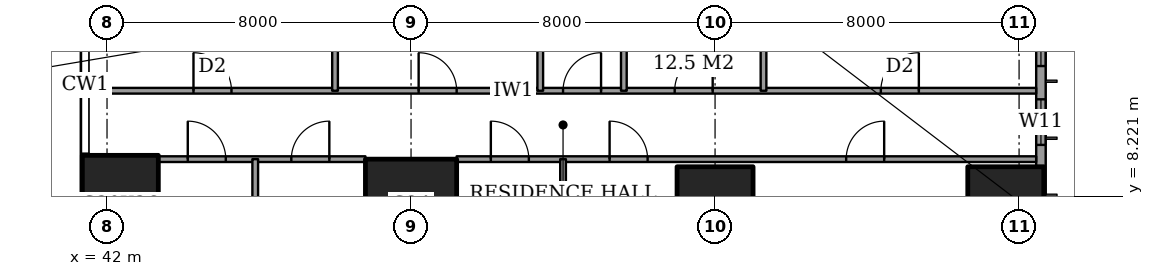
"""IFC4 building model, lengths in metres.
Left out: names, types, materials, properties, quantities, classifications, styles, units other than length and angle.
Written with IfcOpenShell. Run it as: python <this file> out.ifc"""

import sys

from ifc_helpers import new_model, si_unit, direction, frame, frame_2d, origin, origin_2d, place, context, subcontext, project, spatial, rectangle, extrude, element, fill, save


model = new_model("IFC4")
c1 = context("Model", 3, precision=1e-05, world=origin(), true_north=direction((0.0, 1.0)))
c2 = subcontext(c1, "Body", "Model", "MODEL_VIEW")
j1 = project(units=[si_unit("LENGTHUNIT", "METRE"), si_unit("PLANEANGLEUNIT", "RADIAN")], contexts=[c1])
p1 = place(None, origin())
s1 = spatial("IfcSite", under=j1, at=p1, CompositionType="ELEMENT")
p2 = place(p1, origin())
s2 = spatial("IfcBuilding", under=s1, at=p2, CompositionType="ELEMENT")
p3 = place(p2, frame((0.0, 0.0, 117.8)))
s3 = spatial("IfcBuildingStorey", under=s2, at=p3, CompositionType="ELEMENT", Elevation=117.8)
p4 = place(p3, frame((42.35, 8.0, 0.0), z_axis=(0.0, 0.0, 1.0), x_axis=(1.0, 0.0, 0.0)))
e1 = element("IfcColumn", 1, at=p4, inside=s3, PredefinedType="COLUMN", context=c2, shape_type="SweptSolid", body=[
    extrude(rectangle(XDim=2.0, YDim=2.6, at=origin_2d()), origin(), (0.0, 0.0, 1.0), 3.6),
])
p5 = place(p3, frame((50.0, 8.0, 0.0), z_axis=(0.0, 0.0, 1.0), x_axis=(1.0, 0.0, 0.0)))
e2 = element("IfcColumn", 2, at=p5, inside=s3, PredefinedType="COLUMN", context=c2, shape_type="SweptSolid", body=[
    extrude(rectangle(XDim=2.4, YDim=2.4, at=origin_2d()), origin(), (0.0, 0.0, 1.0), 3.6),
])
for number, where, z_axis, x_axis in (
    (3, (58.0, 8.0, 0.0), (0.0, 0.0, 1.0), (1.0, 0.0, 0.0)),
    (4, (65.65, 8.0, 0.0), (0.0, 0.0, 1.0), (1.0, 0.0, 0.0)),
):
    element("IfcColumn", number, at=place(p3, frame(where, z_axis=z_axis, x_axis=x_axis)), inside=s3, PredefinedType="COLUMN", context=c2, shape_type="SweptSolid", body=[
        extrude(rectangle(XDim=2.0, YDim=2.0, at=origin_2d()), origin(), (0.0, 0.0, 1.0), 3.6),
    ])
p6 = place(p3, frame((66.575, 3.175, 0.0), z_axis=(0.0, 0.0, 1.0), x_axis=(0.0, 1.0, 0.0)))
e5 = element("IfcWall", 5, at=p6, inside=s3, PredefinedType="SOLIDWALL", context=c2, shape_type="SweptSolid", body=[
    extrude(rectangle(XDim=41.65, YDim=0.25, at=frame_2d((20.825, 0.0))), origin(), (0.0, 0.0, 1.0), 3.6),
])
p7 = place(p6, frame((0.775, 0.0, 0.4)))
e6 = element("IfcOpeningElement", 6, at=p7, cuts=e5, PredefinedType="OPENING", context=c2, shape_type="SweptSolid", body=[
    extrude(rectangle(XDim=2.4, YDim=2.2, at=frame_2d((1.2, 1.1))), frame((0.0, 0.135, 0.0), z_axis=(0.0, -1.0, 0.0), x_axis=(1.0, 0.0, 0.0)), (0.0, 0.0, 1.0), 0.27),
])
p8 = place(p6, frame((6.4, 0.0, 0.4)))
e7 = element("IfcOpeningElement", 7, at=p8, cuts=e5, PredefinedType="OPENING", context=c2, shape_type="SweptSolid", body=[
    extrude(rectangle(XDim=1.2, YDim=2.2, at=frame_2d((0.6, 1.1))), frame((0.0, 0.135, 0.0), z_axis=(0.0, -1.0, 0.0), x_axis=(1.0, 0.0, 0.0)), (0.0, 0.0, 1.0), 0.27),
])
p9 = place(p6, frame((8.475, 0.0, 0.4)))
e8 = element("IfcOpeningElement", 8, at=p9, cuts=e5, PredefinedType="OPENING", context=c2, shape_type="SweptSolid", body=[
    extrude(rectangle(XDim=2.4, YDim=2.2, at=frame_2d((1.2, 1.1))), frame((0.0, 0.135, 0.0), z_axis=(0.0, -1.0, 0.0), x_axis=(1.0, 0.0, 0.0)), (0.0, 0.0, 1.0), 0.27),
])
p10 = place(p6, frame((15.775, 0.0, 0.4)))
e9 = element("IfcOpeningElement", 9, at=p10, cuts=e5, PredefinedType="OPENING", context=c2, shape_type="SweptSolid", body=[
    extrude(rectangle(XDim=2.4, YDim=2.2, at=frame_2d((1.2, 1.1))), frame((0.0, 0.135, 0.0), z_axis=(0.0, -1.0, 0.0), x_axis=(1.0, 0.0, 0.0)), (0.0, 0.0, 1.0), 0.27),
])
p11 = place(p6, frame((23.475, 0.0, 0.4)))
e10 = element("IfcOpeningElement", 10, at=p11, cuts=e5, PredefinedType="OPENING", context=c2, shape_type="SweptSolid", body=[
    extrude(rectangle(XDim=2.4, YDim=2.2, at=frame_2d((1.2, 1.1))), frame((0.0, 0.135, 0.0), z_axis=(0.0, -1.0, 0.0), x_axis=(1.0, 0.0, 0.0)), (0.0, 0.0, 1.0), 0.27),
])
p12 = place(p6, frame((30.975, 0.0, 0.4)))
e11 = element("IfcOpeningElement", 11, at=p12, cuts=e5, PredefinedType="OPENING", context=c2, shape_type="SweptSolid", body=[
    extrude(rectangle(XDim=2.4, YDim=2.2, at=frame_2d((1.2, 1.1))), frame((0.0, 0.135, 0.0), z_axis=(0.0, -1.0, 0.0), x_axis=(1.0, 0.0, 0.0)), (0.0, 0.0, 1.0), 0.27),
])
p13 = place(p6, frame((34.5, 0.0, 0.4)))
e12 = element("IfcOpeningElement", 12, at=p13, cuts=e5, PredefinedType="OPENING", context=c2, shape_type="SweptSolid", body=[
    extrude(rectangle(XDim=1.2, YDim=2.2, at=frame_2d((0.6, 1.1))), frame((0.0, 0.135, 0.0), z_axis=(0.0, -1.0, 0.0), x_axis=(1.0, 0.0, 0.0)), (0.0, 0.0, 1.0), 0.27),
])
p14 = place(p6, frame((38.475, 0.0, 0.4)))
e13 = element("IfcOpeningElement", 13, at=p14, cuts=e5, PredefinedType="OPENING", context=c2, shape_type="SweptSolid", body=[
    extrude(rectangle(XDim=2.4, YDim=2.2, at=frame_2d((1.2, 1.1))), frame((0.0, 0.135, 0.0), z_axis=(0.0, -1.0, 0.0), x_axis=(1.0, 0.0, 0.0)), (0.0, 0.0, 1.0), 0.27),
])
p15 = place(p3, frame((43.35, 9.2, 0.0), z_axis=(0.0, 0.0, 1.0), x_axis=(1.0, 0.0, 0.0)))
e14 = element("IfcWall", 14, at=p15, inside=s3, PredefinedType="PARTITIONING", context=c2, shape_type="SweptSolid", body=[
    extrude(rectangle(XDim=5.45, YDim=0.15, at=frame_2d((2.725, 0.0))), origin(), (0.0, 0.0, 1.0), 3.35),
])
p16 = place(p15, frame((3.5, 0.0, 0.0)))
e15 = element("IfcOpeningElement", 15, at=p16, cuts=e14, PredefinedType="OPENING", context=c2, shape_type="SweptSolid", body=[
    extrude(rectangle(XDim=1.0, YDim=2.1, at=frame_2d((0.5, 1.05))), frame((0.0, 0.085, 0.0), z_axis=(0.0, -1.0, 0.0), x_axis=(1.0, 0.0, 0.0)), (0.0, 0.0, 1.0), 0.17),
])
p17 = place(p15, frame((0.775, 0.0, 0.0)))
e16 = element("IfcOpeningElement", 16, at=p17, cuts=e14, PredefinedType="OPENING", context=c2, shape_type="SweptSolid", body=[
    extrude(rectangle(XDim=1.0, YDim=2.1, at=frame_2d((0.5, 1.05))), frame((0.0, 0.085, 0.0), z_axis=(0.0, -1.0, 0.0), x_axis=(1.0, 0.0, 0.0)), (0.0, 0.0, 1.0), 0.17),
])
p18 = place(p3, frame((51.2, 9.2, 0.0), z_axis=(0.0, 0.0, 1.0), x_axis=(1.0, 0.0, 0.0)))
e17 = element("IfcWall", 17, at=p18, inside=s3, PredefinedType="PARTITIONING", context=c2, shape_type="SweptSolid", body=[
    extrude(rectangle(XDim=15.25, YDim=0.15, at=frame_2d((7.625, 0.0))), origin(), (0.0, 0.0, 1.0), 3.35),
])
p19 = place(p18, frame((10.25, 0.0, 0.0)))
e18 = element("IfcOpeningElement", 18, at=p19, cuts=e17, PredefinedType="OPENING", context=c2, shape_type="SweptSolid", body=[
    extrude(rectangle(XDim=1.0, YDim=2.1, at=frame_2d((0.5, 1.05))), frame((0.0, 0.085, 0.0), z_axis=(0.0, -1.0, 0.0), x_axis=(1.0, 0.0, 0.0)), (0.0, 0.0, 1.0), 0.17),
])
p20 = place(p18, frame((4.025, 0.0, 0.0)))
e19 = element("IfcOpeningElement", 19, at=p20, cuts=e17, PredefinedType="OPENING", context=c2, shape_type="SweptSolid", body=[
    extrude(rectangle(XDim=1.0, YDim=2.1, at=frame_2d((0.5, 1.05))), frame((0.0, 0.085, 0.0), z_axis=(0.0, -1.0, 0.0), x_axis=(1.0, 0.0, 0.0)), (0.0, 0.0, 1.0), 0.17),
])
p21 = place(p18, frame((0.9, 0.0, 0.0)))
e20 = element("IfcOpeningElement", 20, at=p21, cuts=e17, PredefinedType="OPENING", context=c2, shape_type="SweptSolid", body=[
    extrude(rectangle(XDim=1.0, YDim=2.1, at=frame_2d((0.5, 1.05))), frame((0.0, 0.085, 0.0), z_axis=(0.0, -1.0, 0.0), x_axis=(1.0, 0.0, 0.0)), (0.0, 0.0, 1.0), 0.17),
])
p22 = place(p3, frame((41.439, 11.0, 0.0), z_axis=(0.0, 0.0, 1.0), x_axis=(1.0, 0.0, 0.0)))
e21 = element("IfcWall", 21, at=p22, inside=s3, PredefinedType="PARTITIONING", context=c2, shape_type="SweptSolid", body=[
    extrude(rectangle(XDim=25.011, YDim=0.15, at=frame_2d((12.505, 0.0))), origin(), (0.0, 0.0, 1.0), 3.35),
])
p23 = place(p22, frame((12.561, 0.0, 0.0)))
e22 = element("IfcOpeningElement", 22, at=p23, cuts=e21, PredefinedType="OPENING", context=c2, shape_type="SweptSolid", body=[
    extrude(rectangle(XDim=1.0, YDim=2.1, at=frame_2d((0.5, 1.05))), frame((0.0, 0.085, 0.0), z_axis=(0.0, -1.0, 0.0), x_axis=(1.0, 0.0, 0.0)), (0.0, 0.0, 1.0), 0.17),
])
p24 = place(p22, frame((20.924, 0.0, 0.0)))
e23 = element("IfcOpeningElement", 23, at=p24, cuts=e21, PredefinedType="OPENING", context=c2, shape_type="SweptSolid", body=[
    extrude(rectangle(XDim=1.0, YDim=2.1, at=frame_2d((0.5, 1.05))), frame((0.0, 0.085, 0.0), z_axis=(0.0, -1.0, 0.0), x_axis=(1.0, 0.0, 0.0)), (0.0, 0.0, 1.0), 0.17),
])
p25 = place(p22, frame((15.499, 0.0, 0.0)))
e24 = element("IfcOpeningElement", 24, at=p25, cuts=e21, PredefinedType="OPENING", context=c2, shape_type="SweptSolid", body=[
    extrude(rectangle(XDim=1.0, YDim=2.1, at=frame_2d((0.5, 1.05))), frame((0.0, 0.085, 0.0), z_axis=(0.0, -1.0, 0.0), x_axis=(1.0, 0.0, 0.0)), (0.0, 0.0, 1.0), 0.17),
])
p26 = place(p22, frame((8.761, 0.0, 0.0)))
e25 = element("IfcOpeningElement", 25, at=p26, cuts=e21, PredefinedType="OPENING", context=c2, shape_type="SweptSolid", body=[
    extrude(rectangle(XDim=1.0, YDim=2.1, at=frame_2d((0.5, 1.05))), frame((0.0, 0.085, 0.0), z_axis=(0.0, -1.0, 0.0), x_axis=(1.0, 0.0, 0.0)), (0.0, 0.0, 1.0), 0.17),
])
p27 = place(p22, frame((2.836, 0.0, 0.0)))
e26 = element("IfcOpeningElement", 26, at=p27, cuts=e21, PredefinedType="OPENING", context=c2, shape_type="SweptSolid", body=[
    extrude(rectangle(XDim=1.0, YDim=2.1, at=frame_2d((0.5, 1.05))), frame((0.0, 0.085, 0.0), z_axis=(0.0, -1.0, 0.0), x_axis=(1.0, 0.0, 0.0)), (0.0, 0.0, 1.0), 0.17),
])
p28 = place(p3, frame((45.9, -0.45, 0.0), z_axis=(0.0, 0.0, 1.0), x_axis=(0.0, 1.0, 0.0)))
e27 = element("IfcWall", 27, at=p28, inside=s3, PredefinedType="PARTITIONING", context=c2, shape_type="SweptSolid", body=[
    extrude(rectangle(XDim=9.65, YDim=0.15, at=frame_2d((4.825, 0.0))), origin(), (0.0, 0.0, 1.0), 3.35),
])
for number, where, z_axis, x_axis in (
    (28, (48.0, 11.0, 0.0), (0.0, 0.0, 1.0), (0.0, 1.0, 0.0)),
    (29, (53.4, 11.0, 0.0), (0.0, 0.0, 1.0), (0.0, 1.0, 0.0)),
):
    element("IfcWall", number, at=place(p3, frame(where, z_axis=z_axis, x_axis=x_axis)), inside=s3, PredefinedType="PARTITIONING", context=c2, shape_type="SweptSolid", body=[
        extrude(rectangle(XDim=6.0, YDim=0.15, at=frame_2d((3.0, 0.0))), origin(), (0.0, 0.0, 1.0), 3.35),
    ])
p29 = place(p3, frame((54.0, -0.45, 0.0), z_axis=(0.0, 0.0, 1.0), x_axis=(0.0, 1.0, 0.0)))
e30 = element("IfcWall", 30, at=p29, inside=s3, PredefinedType="PARTITIONING", context=c2, shape_type="SweptSolid", body=[
    extrude(rectangle(XDim=9.65, YDim=0.15, at=frame_2d((4.825, 0.0))), origin(), (0.0, 0.0, 1.0), 3.35),
])
p30 = place(p3, frame((55.6, 11.0, 0.0), z_axis=(0.0, 0.0, 1.0), x_axis=(0.0, 1.0, 0.0)))
e31 = element("IfcWall", 31, at=p30, inside=s3, PredefinedType="PARTITIONING", context=c2, shape_type="SweptSolid", body=[
    extrude(rectangle(XDim=10.6, YDim=0.15, at=frame_2d((5.3, 0.0))), origin(), (0.0, 0.0, 1.0), 3.35),
])
p31 = place(p30, frame((7.8, 0.0, 0.0)))
e32 = element("IfcOpeningElement", 32, at=p31, cuts=e31, PredefinedType="OPENING", context=c2, shape_type="SweptSolid", body=[
    extrude(rectangle(XDim=1.0, YDim=2.1, at=frame_2d((0.5, 1.05))), frame((0.0, 0.085, 0.0), z_axis=(0.0, -1.0, 0.0), x_axis=(1.0, 0.0, 0.0)), (0.0, 0.0, 1.0), 0.17),
])
p32 = place(p3, frame((59.275, 11.0, 0.0), z_axis=(0.0, 0.0, 1.0), x_axis=(0.0, 1.0, 0.0)))
e33 = element("IfcWall", 33, at=p32, inside=s3, PredefinedType="PARTITIONING", context=c2, shape_type="SweptSolid", body=[
    extrude(rectangle(XDim=3.8, YDim=0.15, at=frame_2d((1.9, 0.0))), origin(), (0.0, 0.0, 1.0), 3.35),
])
p33 = place(p8, origin())
e34 = element("IfcWindow", 34, at=p33, inside=s3, PartitioningType="SINGLE_PANEL", PredefinedType="WINDOW", context=c2, shape_type="SweptSolid", body=[
    extrude(rectangle(XDim=1.2, YDim=2.2, at=frame_2d((0.6, 1.1))), frame((0.0, 0.03, 0.0), z_axis=(0.0, -1.0, 0.0), x_axis=(1.0, 0.0, 0.0)), (0.0, 0.0, 1.0), 0.06),
])
fill(e7, e34)
p34 = place(p9, origin())
e35 = element("IfcWindow", 35, at=p34, inside=s3, PartitioningType="SINGLE_PANEL", PredefinedType="WINDOW", context=c2, shape_type="SweptSolid", body=[
    extrude(rectangle(XDim=2.4, YDim=2.2, at=frame_2d((1.2, 1.1))), frame((0.0, 0.03, 0.0), z_axis=(0.0, -1.0, 0.0), x_axis=(1.0, 0.0, 0.0)), (0.0, 0.0, 1.0), 0.06),
])
fill(e8, e35)
p35 = place(p19, origin())
e36 = element("IfcDoor", 36, at=p35, inside=s3, OperationType="SINGLE_SWING_LEFT", PredefinedType="DOOR", context=c2, shape_type="SweptSolid", body=[
    extrude(rectangle(XDim=1.0, YDim=2.1, at=frame_2d((0.5, 1.05))), frame((0.0, 0.025, 0.0), z_axis=(0.0, -1.0, 0.0), x_axis=(1.0, 0.0, 0.0)), (0.0, 0.0, 1.0), 0.05),
])
fill(e18, e36)
p36 = place(p20, origin())
e37 = element("IfcDoor", 37, at=p36, inside=s3, OperationType="SINGLE_SWING_RIGHT", PredefinedType="DOOR", context=c2, shape_type="SweptSolid", body=[
    extrude(rectangle(XDim=1.0, YDim=2.1, at=frame_2d((0.5, 1.05))), frame((0.0, 0.025, 0.0), z_axis=(0.0, -1.0, 0.0), x_axis=(1.0, 0.0, 0.0)), (0.0, 0.0, 1.0), 0.05),
])
fill(e19, e37)
p37 = place(p21, origin())
e38 = element("IfcDoor", 38, at=p37, inside=s3, OperationType="SINGLE_SWING_RIGHT", PredefinedType="DOOR", context=c2, shape_type="SweptSolid", body=[
    extrude(rectangle(XDim=1.0, YDim=2.1, at=frame_2d((0.5, 1.05))), frame((0.0, 0.025, 0.0), z_axis=(0.0, -1.0, 0.0), x_axis=(1.0, 0.0, 0.0)), (0.0, 0.0, 1.0), 0.05),
])
fill(e20, e38)
p38 = place(p16, origin())
e39 = element("IfcDoor", 39, at=p38, inside=s3, OperationType="SINGLE_SWING_LEFT", PredefinedType="DOOR", context=c2, shape_type="SweptSolid", body=[
    extrude(rectangle(XDim=1.0, YDim=2.1, at=frame_2d((0.5, 1.05))), frame((0.0, 0.025, 0.0), z_axis=(0.0, -1.0, 0.0), x_axis=(1.0, 0.0, 0.0)), (0.0, 0.0, 1.0), 0.05),
])
fill(e15, e39)
p39 = place(p17, origin())
e40 = element("IfcDoor", 40, at=p39, inside=s3, OperationType="SINGLE_SWING_RIGHT", PredefinedType="DOOR", context=c2, shape_type="SweptSolid", body=[
    extrude(rectangle(XDim=1.0, YDim=2.1, at=frame_2d((0.5, 1.05))), frame((0.0, 0.025, 0.0), z_axis=(0.0, -1.0, 0.0), x_axis=(1.0, 0.0, 0.0)), (0.0, 0.0, 1.0), 0.05),
])
fill(e16, e40)
p40 = place(p23, origin())
e41 = element("IfcDoor", 41, at=p40, inside=s3, OperationType="SINGLE_SWING_LEFT", PredefinedType="DOOR", context=c2, shape_type="SweptSolid", body=[
    extrude(rectangle(XDim=1.0, YDim=2.1, at=frame_2d((0.5, 1.05))), frame((0.0, 0.025, 0.0), z_axis=(0.0, -1.0, 0.0), x_axis=(1.0, 0.0, 0.0)), (0.0, 0.0, 1.0), 0.05),
])
fill(e22, e41)
p41 = place(p24, origin())
e42 = element("IfcDoor", 42, at=p41, inside=s3, OperationType="SINGLE_SWING_LEFT", PredefinedType="DOOR", context=c2, shape_type="SweptSolid", body=[
    extrude(rectangle(XDim=1.0, YDim=2.1, at=frame_2d((0.5, 1.05))), frame((0.0, 0.025, 0.0), z_axis=(0.0, -1.0, 0.0), x_axis=(1.0, 0.0, 0.0)), (0.0, 0.0, 1.0), 0.05),
])
fill(e23, e42)
p42 = place(p25, origin())
e43 = element("IfcDoor", 43, at=p42, inside=s3, OperationType="SINGLE_SWING_LEFT", PredefinedType="DOOR", context=c2, shape_type="SweptSolid", body=[
    extrude(rectangle(XDim=1.0, YDim=2.1, at=frame_2d((0.5, 1.05))), frame((0.0, 0.025, 0.0), z_axis=(0.0, -1.0, 0.0), x_axis=(1.0, 0.0, 0.0)), (0.0, 0.0, 1.0), 0.05),
])
fill(e24, e43)
p43 = place(p26, origin())
e44 = element("IfcDoor", 44, at=p43, inside=s3, OperationType="SINGLE_SWING_RIGHT", PredefinedType="DOOR", context=c2, shape_type="SweptSolid", body=[
    extrude(rectangle(XDim=1.0, YDim=2.1, at=frame_2d((0.5, 1.05))), frame((0.0, 0.025, 0.0), z_axis=(0.0, -1.0, 0.0), x_axis=(1.0, 0.0, 0.0)), (0.0, 0.0, 1.0), 0.05),
])
fill(e25, e44)
p44 = place(p27, origin())
e45 = element("IfcDoor", 45, at=p44, inside=s3, OperationType="SINGLE_SWING_RIGHT", PredefinedType="DOOR", context=c2, shape_type="SweptSolid", body=[
    extrude(rectangle(XDim=1.0, YDim=2.1, at=frame_2d((0.5, 1.05))), frame((0.0, 0.025, 0.0), z_axis=(0.0, -1.0, 0.0), x_axis=(1.0, 0.0, 0.0)), (0.0, 0.0, 1.0), 0.05),
])
fill(e26, e45)
save(model, sys.argv[1])
